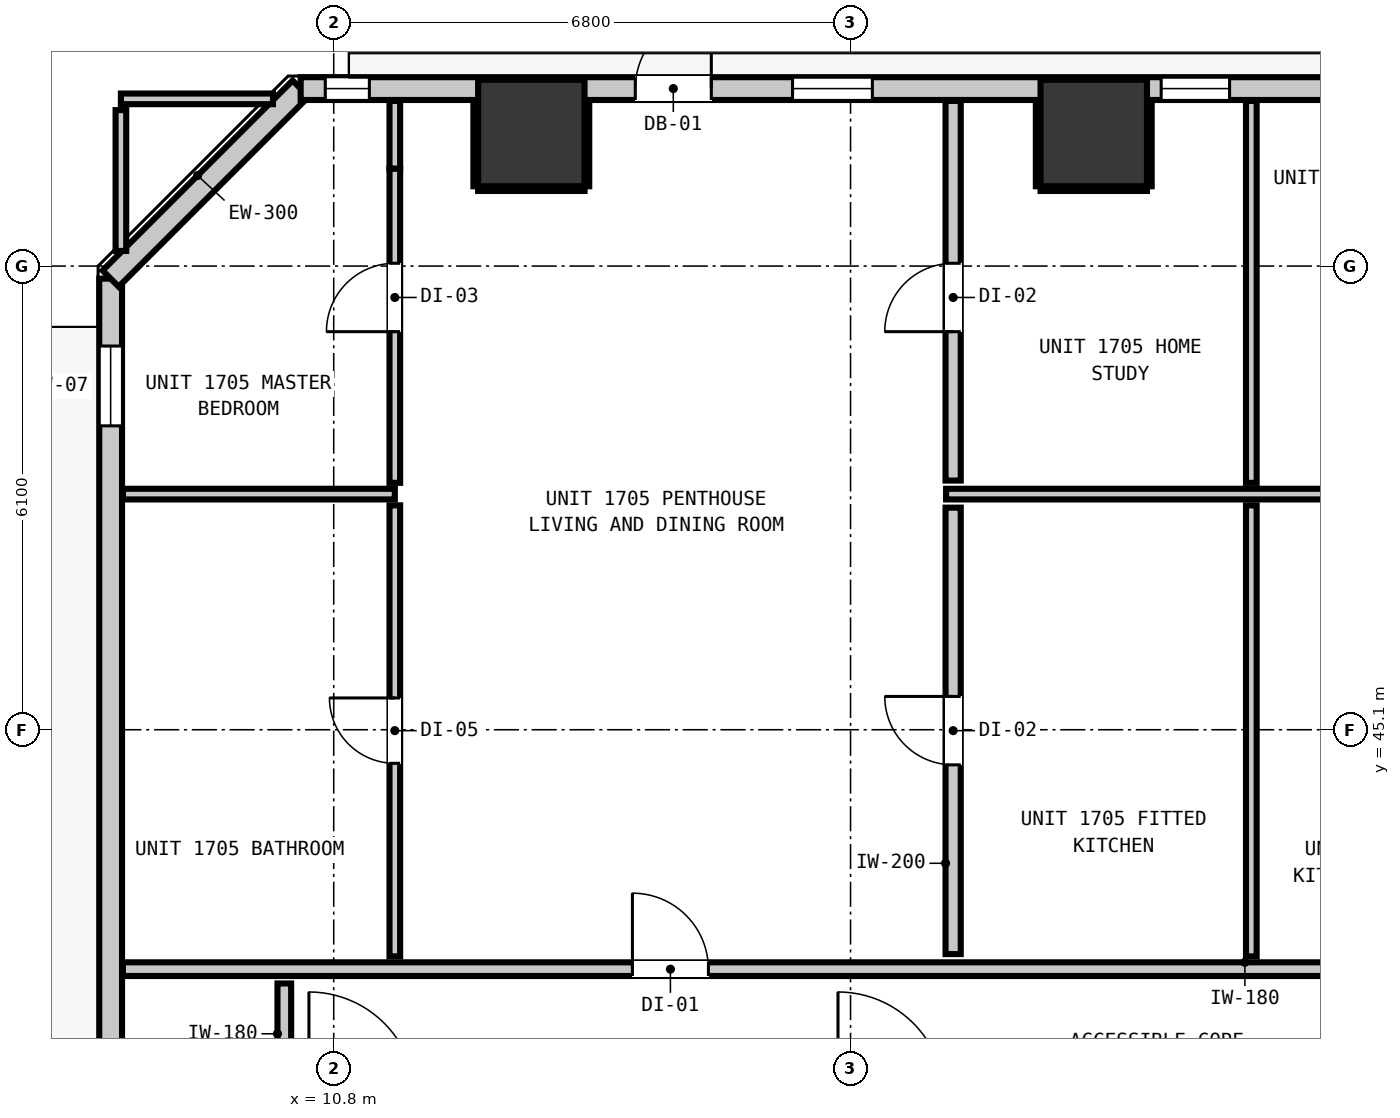
"""IFC4 building model, lengths in metres.
Left out: names, types, materials, properties, quantities, classifications, styles, units other than length and angle.
Written with IfcOpenShell. Run it as: python <this file> out.ifc"""

import sys

from ifc_helpers import new_model, si_unit, direction, frame, frame_2d, origin, origin_2d, place, context, subcontext, project, spatial, rectangle, extrude, element, fill, save


model = new_model("IFC4")
c1 = context("Model", 3, precision=1e-05, world=origin(), true_north=direction((0.0, 1.0)))
c2 = subcontext(c1, "Body", "Model", "MODEL_VIEW")
j1 = project(units=[si_unit("LENGTHUNIT", "METRE"), si_unit("PLANEANGLEUNIT", "RADIAN")], contexts=[c1])
p1 = place(None, origin())
s1 = spatial("IfcSite", under=j1, at=p1, CompositionType="ELEMENT")
p2 = place(p1, origin())
s2 = spatial("IfcBuilding", under=s1, at=p2, CompositionType="ELEMENT")
p3 = place(p2, frame((0.0, 0.0, 61.84)))
s3 = spatial("IfcBuildingStorey", under=s2, at=p3, CompositionType="ELEMENT", Elevation=61.84)
for number, where, z_axis, x_axis in (
    (1, (13.4, 52.95, -0.2), (0.0, 0.0, 1.0), (1.0, 0.0, 0.0)),
    (2, (20.8, 52.95, -0.2), (0.0, 0.0, 1.0), (1.0, 0.0, 0.0)),
):
    element("IfcColumn", number, at=place(p3, frame(where, z_axis=z_axis, x_axis=x_axis)), inside=s3, PredefinedType="COLUMN", context=c2, shape_type="SweptSolid", body=[
        extrude(rectangle(XDim=1.4, YDim=1.4, at=origin_2d()), origin(), (0.0, 0.0, 1.0), 3.52),
    ])
p4 = place(p3, frame((7.865, 16.365, 0.0), z_axis=(0.0, 0.0, 1.0), x_axis=(0.0, 1.0, 0.0)))
e3 = element("IfcWall", 3, at=p4, inside=s3, PredefinedType="STANDARD", context=c2, shape_type="SweptSolid", body=[
    extrude(rectangle(XDim=34.67, YDim=0.3, at=frame_2d((17.335, 0.0))), origin(), (0.0, 0.0, 1.0), 3.06),
])
p5 = place(p4, frame((1.251, 0.0, 0.0)))
e4 = element("IfcOpeningElement", 4, at=p5, cuts=e3, PredefinedType="OPENING", context=c2, shape_type="SweptSolid", body=[
    extrude(rectangle(XDim=1.0, YDim=2.15, at=frame_2d((0.5, 1.075))), frame((0.0, 0.16, 0.0), z_axis=(0.0, -1.0, 0.0), x_axis=(1.0, 0.0, 0.0)), (0.0, 0.0, 1.0), 0.32),
])
p6 = place(p4, frame((32.733, 0.0, 0.85)))
e5 = element("IfcOpeningElement", 5, at=p6, cuts=e3, PredefinedType="OPENING", context=c2, shape_type="SweptSolid", body=[
    extrude(rectangle(XDim=1.05, YDim=1.65, at=frame_2d((0.525, 0.825))), frame((0.0, 0.16, 0.0), z_axis=(0.0, -1.0, 0.0), x_axis=(1.0, 0.0, 0.0)), (0.0, 0.0, 1.0), 0.32),
])
p7 = place(p3, frame((7.865, 51.035, 0.0), z_axis=(0.0, 0.0, 1.0), x_axis=(0.707106781187, 0.707106781187, 0.0)))
e6 = element("IfcWall", 6, at=p7, inside=s3, PredefinedType="STANDARD", context=c2, shape_type="SweptSolid", body=[
    extrude(rectangle(XDim=3.536, YDim=0.3, at=frame_2d((1.768, 0.0))), origin(), (0.0, 0.0, 1.0), 3.06),
])
p8 = place(p3, frame((10.365, 53.535, 0.0), z_axis=(0.0, 0.0, 1.0), x_axis=(1.0, 0.0, 0.0)))
e7 = element("IfcWall", 7, at=p8, inside=s3, PredefinedType="STANDARD", context=c2, shape_type="SweptSolid", body=[
    extrude(rectangle(XDim=37.47, YDim=0.3, at=frame_2d((18.735, 0.0))), origin(), (0.0, 0.0, 1.0), 3.06),
])
p9 = place(p8, frame((4.403, 0.0, 0.0)))
e8 = element("IfcOpeningElement", 8, at=p9, cuts=e7, PredefinedType="OPENING", context=c2, shape_type="SweptSolid", body=[
    extrude(rectangle(XDim=1.0, YDim=2.15, at=frame_2d((0.5, 1.075))), frame((0.0, 0.16, 0.0), z_axis=(0.0, -1.0, 0.0), x_axis=(1.0, 0.0, 0.0)), (0.0, 0.0, 1.0), 0.32),
])
p10 = place(p8, frame((6.472, 0.0, 0.85)))
e9 = element("IfcOpeningElement", 9, at=p10, cuts=e7, PredefinedType="OPENING", context=c2, shape_type="SweptSolid", body=[
    extrude(rectangle(XDim=1.05, YDim=1.65, at=frame_2d((0.525, 0.825))), frame((0.0, 0.16, 0.0), z_axis=(0.0, -1.0, 0.0), x_axis=(1.0, 0.0, 0.0)), (0.0, 0.0, 1.0), 0.32),
])
p11 = place(p8, frame((0.324, 0.0, 0.85)))
e10 = element("IfcOpeningElement", 10, at=p11, cuts=e7, PredefinedType="OPENING", context=c2, shape_type="SweptSolid", body=[
    extrude(rectangle(XDim=0.58, YDim=1.5, at=frame_2d((0.29, 0.75))), frame((0.0, 0.16, 0.0), z_axis=(0.0, -1.0, 0.0), x_axis=(1.0, 0.0, 0.0)), (0.0, 0.0, 1.0), 0.32),
])
p12 = place(p8, frame((11.322, 0.0, 0.85)))
e11 = element("IfcOpeningElement", 11, at=p12, cuts=e7, PredefinedType="OPENING", context=c2, shape_type="SweptSolid", body=[
    extrude(rectangle(XDim=0.9, YDim=1.5, at=frame_2d((0.45, 0.75))), frame((0.0, 0.16, 0.0), z_axis=(0.0, -1.0, 0.0), x_axis=(1.0, 0.0, 0.0)), (0.0, 0.0, 1.0), 0.32),
])
p13 = place(p8, frame((21.42, 0.0, 0.85)))
e12 = element("IfcOpeningElement", 12, at=p13, cuts=e7, PredefinedType="OPENING", context=c2, shape_type="SweptSolid", body=[
    extrude(rectangle(XDim=1.05, YDim=1.65, at=frame_2d((0.525, 0.825))), frame((0.0, 0.16, 0.0), z_axis=(0.0, -1.0, 0.0), x_axis=(1.0, 0.0, 0.0)), (0.0, 0.0, 1.0), 0.32),
])
p14 = place(p8, frame((31.346, 0.0, 0.85)))
e13 = element("IfcOpeningElement", 13, at=p14, cuts=e7, PredefinedType="OPENING", context=c2, shape_type="SweptSolid", body=[
    extrude(rectangle(XDim=1.05, YDim=1.65, at=frame_2d((0.525, 0.825))), frame((0.0, 0.16, 0.0), z_axis=(0.0, -1.0, 0.0), x_axis=(1.0, 0.0, 0.0)), (0.0, 0.0, 1.0), 0.32),
])
p15 = place(p8, frame((27.107, 0.0, 0.85)))
e14 = element("IfcOpeningElement", 14, at=p15, cuts=e7, PredefinedType="OPENING", context=c2, shape_type="SweptSolid", body=[
    extrude(rectangle(XDim=0.58, YDim=1.5, at=frame_2d((0.29, 0.75))), frame((0.0, 0.16, 0.0), z_axis=(0.0, -1.0, 0.0), x_axis=(1.0, 0.0, 0.0)), (0.0, 0.0, 1.0), 0.32),
])
p16 = place(p8, frame((36.056, 0.0, 0.85)))
e15 = element("IfcOpeningElement", 15, at=p16, cuts=e7, PredefinedType="OPENING", context=c2, shape_type="SweptSolid", body=[
    extrude(rectangle(XDim=1.05, YDim=1.65, at=frame_2d((0.525, 0.825))), frame((0.0, 0.16, 0.0), z_axis=(0.0, -1.0, 0.0), x_axis=(1.0, 0.0, 0.0)), (0.0, 0.0, 1.0), 0.32),
])
p17 = place(p3, frame((8.027, 41.95, 0.0), z_axis=(0.0, 0.0, 1.0), x_axis=(1.0, 0.0, 0.0)))
e16 = element("IfcWall", 16, at=p17, inside=s3, PredefinedType="PARTITIONING", context=c2, shape_type="SweptSolid", body=[
    extrude(rectangle(XDim=42.146, YDim=0.18, at=frame_2d((21.073, 0.0))), origin(), (0.0, 0.0, 1.0), 3.06),
])
p18 = place(p17, frame((6.703, 0.0, 0.0)))
e17 = element("IfcOpeningElement", 17, at=p18, cuts=e16, PredefinedType="OPENING", context=c2, shape_type="SweptSolid", body=[
    extrude(rectangle(XDim=1.0, YDim=2.15, at=frame_2d((0.5, 1.075))), frame((0.0, 0.1, 0.0), z_axis=(0.0, -1.0, 0.0), x_axis=(1.0, 0.0, 0.0)), (0.0, 0.0, 1.0), 0.2),
])
p19 = place(p17, frame((21.82, 0.0, 0.0)))
e18 = element("IfcOpeningElement", 18, at=p19, cuts=e16, PredefinedType="OPENING", context=c2, shape_type="SweptSolid", body=[
    extrude(rectangle(XDim=1.0, YDim=2.15, at=frame_2d((0.5, 1.075))), frame((0.0, 0.1, 0.0), z_axis=(0.0, -1.0, 0.0), x_axis=(1.0, 0.0, 0.0)), (0.0, 0.0, 1.0), 0.2),
])
p20 = place(p17, frame((33.708, 0.0, 0.0)))
e19 = element("IfcOpeningElement", 19, at=p20, cuts=e16, PredefinedType="OPENING", context=c2, shape_type="SweptSolid", body=[
    extrude(rectangle(XDim=1.0, YDim=2.15, at=frame_2d((0.5, 1.075))), frame((0.0, 0.1, 0.0), z_axis=(0.0, -1.0, 0.0), x_axis=(1.0, 0.0, 0.0)), (0.0, 0.0, 1.0), 0.2),
])
p21 = place(p3, frame((8.027, 48.2, 0.0), z_axis=(0.0, 0.0, 1.0), x_axis=(1.0, 0.0, 0.0)))
e20 = element("IfcWall", 20, at=p21, inside=s3, PredefinedType="PARTITIONING", context=c2, shape_type="SweptSolid", body=[
    extrude(rectangle(XDim=3.577, YDim=0.14, at=frame_2d((1.789, 0.0))), origin(), (0.0, 0.0, 1.0), 3.06),
])
p22 = place(p3, frame((18.857, 48.2, 0.0), z_axis=(0.0, 0.0, 1.0), x_axis=(1.0, 0.0, 0.0)))
e21 = element("IfcWall", 21, at=p22, inside=s3, PredefinedType="PARTITIONING", context=c2, shape_type="SweptSolid", body=[
    extrude(rectangle(XDim=31.316, YDim=0.14, at=frame_2d((15.658, 0.0))), origin(), (0.0, 0.0, 1.0), 3.06),
])
p23 = place(p22, frame((11.04, 0.0, 0.0)))
e22 = element("IfcOpeningElement", 22, at=p23, cuts=e21, PredefinedType="OPENING", context=c2, shape_type="SweptSolid", body=[
    extrude(rectangle(XDim=0.9, YDim=2.1, at=frame_2d((0.45, 1.05))), frame((0.0, 0.08, 0.0), z_axis=(0.0, -1.0, 0.0), x_axis=(1.0, 0.0, 0.0)), (0.0, 0.0, 1.0), 0.16),
])
p24 = place(p22, frame((22.928, 0.0, 0.0)))
e23 = element("IfcOpeningElement", 23, at=p24, cuts=e21, PredefinedType="OPENING", context=c2, shape_type="SweptSolid", body=[
    extrude(rectangle(XDim=0.9, YDim=2.1, at=frame_2d((0.45, 1.05))), frame((0.0, 0.08, 0.0), z_axis=(0.0, -1.0, 0.0), x_axis=(1.0, 0.0, 0.0)), (0.0, 0.0, 1.0), 0.16),
])
p25 = place(p3, frame((8.0, 53.4, 0.0), z_axis=(0.0, 0.0, 1.0), x_axis=(1.0, 0.0, 0.0)))
e24 = element("IfcWall", 24, at=p25, inside=s3, PredefinedType="PARTITIONING", context=c2, shape_type="SweptSolid", body=[
    extrude(rectangle(XDim=2.001, YDim=0.14, at=frame_2d((1.0, 0.0))), origin(), (0.0, 0.0, 1.0), 3.06),
])
p26 = place(p3, frame((18.95, 42.148, 0.0), z_axis=(0.0, 0.0, 1.0), x_axis=(0.0, 1.0, 0.0)))
e25 = element("IfcWall", 25, at=p26, inside=s3, PredefinedType="PARTITIONING", context=c2, shape_type="SweptSolid", body=[
    extrude(rectangle(XDim=5.874, YDim=0.2, at=frame_2d((2.937, 0.0))), origin(), (0.0, 0.0, 1.0), 3.06),
])
p27 = place(p26, frame((2.49, 0.0, 0.0)))
e26 = element("IfcOpeningElement", 26, at=p27, cuts=e25, PredefinedType="OPENING", context=c2, shape_type="SweptSolid", body=[
    extrude(rectangle(XDim=0.9, YDim=2.1, at=frame_2d((0.45, 1.05))), frame((0.0, 0.11, 0.0), z_axis=(0.0, -1.0, 0.0), x_axis=(1.0, 0.0, 0.0)), (0.0, 0.0, 1.0), 0.22),
])
p28 = place(p3, frame((18.95, 48.378, 0.0), z_axis=(0.0, 0.0, 1.0), x_axis=(0.0, 1.0, 0.0)))
e27 = element("IfcWall", 27, at=p28, inside=s3, PredefinedType="PARTITIONING", context=c2, shape_type="SweptSolid", body=[
    extrude(rectangle(XDim=4.995, YDim=0.2, at=frame_2d((2.498, 0.0))), origin(), (0.0, 0.0, 1.0), 3.06),
])
p29 = place(p28, frame((1.959, 0.0, 0.0)))
e28 = element("IfcOpeningElement", 28, at=p29, cuts=e27, PredefinedType="OPENING", context=c2, shape_type="SweptSolid", body=[
    extrude(rectangle(XDim=0.9, YDim=2.1, at=frame_2d((0.45, 1.05))), frame((0.0, 0.11, 0.0), z_axis=(0.0, -1.0, 0.0), x_axis=(1.0, 0.0, 0.0)), (0.0, 0.0, 1.0), 0.22),
])
p30 = place(p3, frame((10.15, 40.438, 0.0), z_axis=(0.0, 0.0, 1.0), x_axis=(0.0, 1.0, 0.0)))
e29 = element("IfcWall", 29, at=p30, inside=s3, PredefinedType="PARTITIONING", context=c2, shape_type="SweptSolid", body=[
    extrude(rectangle(XDim=1.324, YDim=0.18, at=frame_2d((0.662, 0.0))), origin(), (0.0, 0.0, 1.0), 3.06),
])
p31 = place(p3, frame((8.0, 51.399, 0.0), z_axis=(0.0, 0.0, 1.0), x_axis=(0.0, 1.0, 0.0)))
e30 = element("IfcWall", 30, at=p31, inside=s3, PredefinedType="PARTITIONING", context=c2, shape_type="SweptSolid", body=[
    extrude(rectangle(XDim=1.853, YDim=0.14, at=frame_2d((0.927, 0.0))), origin(), (0.0, 0.0, 1.0), 3.06),
])
p32 = place(p3, frame((11.604, 42.118, 0.0), z_axis=(0.0, 0.0, 1.0), x_axis=(0.0, 1.0, 0.0)))
e31 = element("IfcWall", 31, at=p32, inside=s3, PredefinedType="PARTITIONING", context=c2, shape_type="SweptSolid", body=[
    extrude(rectangle(XDim=5.934, YDim=0.14, at=frame_2d((2.967, 0.0))), origin(), (0.0, 0.0, 1.0), 2.445),
])
p33 = place(p32, frame((2.54, 0.0, 0.0)))
e32 = element("IfcOpeningElement", 32, at=p33, cuts=e31, PredefinedType="OPENING", context=c2, shape_type="SweptSolid", body=[
    extrude(rectangle(XDim=0.86, YDim=2.02, at=frame_2d((0.43, 1.01))), frame((0.0, 0.08, 0.0), z_axis=(0.0, -1.0, 0.0), x_axis=(1.0, 0.0, 0.0)), (0.0, 0.0, 1.0), 0.16),
])
p34 = place(p3, frame((11.604, 48.348, 0.0), z_axis=(0.0, 0.0, 1.0), x_axis=(0.0, 1.0, 0.0)))
e33 = element("IfcWall", 33, at=p34, inside=s3, PredefinedType="PARTITIONING", context=c2, shape_type="SweptSolid", body=[
    extrude(rectangle(XDim=4.135, YDim=0.14, at=frame_2d((2.067, 0.0))), origin(), (0.0, 0.0, 1.0), 2.445),
])
p35 = place(p34, frame((1.989, 0.0, 0.0)))
e34 = element("IfcOpeningElement", 34, at=p35, cuts=e33, PredefinedType="OPENING", context=c2, shape_type="SweptSolid", body=[
    extrude(rectangle(XDim=0.9, YDim=2.1, at=frame_2d((0.45, 1.05))), frame((0.0, 0.08, 0.0), z_axis=(0.0, -1.0, 0.0), x_axis=(1.0, 0.0, 0.0)), (0.0, 0.0, 1.0), 0.16),
])
p36 = place(p3, frame((11.604, 52.483, 0.0), z_axis=(0.0, 0.0, 1.0), x_axis=(0.0, 1.0, 0.0)))
e35 = element("IfcWall", 35, at=p36, inside=s3, PredefinedType="PARTITIONING", context=c2, shape_type="SweptSolid", body=[
    extrude(rectangle(XDim=0.89, YDim=0.14, at=frame_2d((0.445, 0.0))), origin(), (0.0, 0.0, 1.0), 3.06),
])
p37 = place(p3, frame((22.873, 42.118, 0.0), z_axis=(0.0, 0.0, 1.0), x_axis=(0.0, 1.0, 0.0)))
e36 = element("IfcWall", 36, at=p37, inside=s3, PredefinedType="PARTITIONING", context=c2, shape_type="SweptSolid", body=[
    extrude(rectangle(XDim=5.934, YDim=0.14, at=frame_2d((2.967, 0.0))), origin(), (0.0, 0.0, 1.0), 3.06),
])
p38 = place(p3, frame((22.873, 48.348, 0.0), z_axis=(0.0, 0.0, 1.0), x_axis=(0.0, 1.0, 0.0)))
e37 = element("IfcWall", 37, at=p38, inside=s3, PredefinedType="PARTITIONING", context=c2, shape_type="SweptSolid", body=[
    extrude(rectangle(XDim=5.025, YDim=0.14, at=frame_2d((2.513, 0.0))), origin(), (0.0, 0.0, 1.0), 3.06),
])
p39 = place(p3, frame((12.7, 52.218, 0.0), z_axis=(0.0, 0.0, 1.0), x_axis=(1.0, 0.0, 0.0)))
e38 = element("IfcWall", 38, at=p39, inside=s3, PredefinedType="PARTITIONING", context=c2, shape_type="SweptSolid", body=[
    extrude(rectangle(XDim=1.4, YDim=0.06, at=frame_2d((0.7, 0.0))), origin(), (0.0, 0.0, 1.0), 1.45),
])
for number, where, z_axis, x_axis in (
    (39, (12.668, 52.25, 0.0), (0.0, 0.0, 1.0), (0.0, 1.0, 0.0)),
    (40, (14.132, 52.25, 0.0), (0.0, 0.0, 1.0), (0.0, 1.0, 0.0)),
):
    element("IfcWall", number, at=place(p3, frame(where, z_axis=z_axis, x_axis=x_axis)), inside=s3, PredefinedType="PARTITIONING", context=c2, shape_type="SweptSolid", body=[
        extrude(rectangle(XDim=1.12, YDim=0.06, at=frame_2d((0.56, 0.0))), origin(), (0.0, 0.0, 1.0), 1.45),
    ])
p40 = place(p3, frame((20.1, 52.218, 0.0), z_axis=(0.0, 0.0, 1.0), x_axis=(1.0, 0.0, 0.0)))
e41 = element("IfcWall", 41, at=p40, inside=s3, PredefinedType="PARTITIONING", context=c2, shape_type="SweptSolid", body=[
    extrude(rectangle(XDim=1.4, YDim=0.06, at=frame_2d((0.7, 0.0))), origin(), (0.0, 0.0, 1.0), 1.45),
])
for number, where, z_axis, x_axis in (
    (42, (20.068, 52.25, 0.0), (0.0, 0.0, 1.0), (0.0, 1.0, 0.0)),
    (43, (21.532, 52.25, 0.0), (0.0, 0.0, 1.0), (0.0, 1.0, 0.0)),
):
    element("IfcWall", number, at=place(p3, frame(where, z_axis=z_axis, x_axis=x_axis)), inside=s3, PredefinedType="PARTITIONING", context=c2, shape_type="SweptSolid", body=[
        extrude(rectangle(XDim=1.12, YDim=0.06, at=frame_2d((0.56, 0.0))), origin(), (0.0, 0.0, 1.0), 1.45),
    ])
p41 = place(p9, origin())
e44 = element("IfcDoor", 44, at=p41, inside=s3, OperationType="SINGLE_SWING_RIGHT", PredefinedType="DOOR", context=c2, shape_type="SweptSolid", body=[
    extrude(rectangle(XDim=1.0, YDim=2.15, at=frame_2d((0.5, 1.075))), frame((0.0, 0.025, 0.0), z_axis=(0.0, -1.0, 0.0), x_axis=(1.0, 0.0, 0.0)), (0.0, 0.0, 1.0), 0.05),
])
fill(e8, e44)
p42 = place(p6, origin())
e45 = element("IfcWindow", 45, at=p42, inside=s3, PartitioningType="SINGLE_PANEL", PredefinedType="WINDOW", context=c2, shape_type="SweptSolid", body=[
    extrude(rectangle(XDim=1.05, YDim=1.65, at=frame_2d((0.525, 0.825))), frame((0.0, 0.03, 0.0), z_axis=(0.0, -1.0, 0.0), x_axis=(1.0, 0.0, 0.0)), (0.0, 0.0, 1.0), 0.06),
])
fill(e5, e45)
p43 = place(p10, origin())
e46 = element("IfcWindow", 46, at=p43, inside=s3, PartitioningType="SINGLE_PANEL", PredefinedType="WINDOW", context=c2, shape_type="SweptSolid", body=[
    extrude(rectangle(XDim=1.05, YDim=1.65, at=frame_2d((0.525, 0.825))), frame((0.0, 0.03, 0.0), z_axis=(0.0, -1.0, 0.0), x_axis=(1.0, 0.0, 0.0)), (0.0, 0.0, 1.0), 0.06),
])
fill(e9, e46)
p44 = place(p11, origin())
e47 = element("IfcWindow", 47, at=p44, inside=s3, PartitioningType="SINGLE_PANEL", PredefinedType="WINDOW", context=c2, shape_type="SweptSolid", body=[
    extrude(rectangle(XDim=0.58, YDim=1.5, at=frame_2d((0.29, 0.75))), frame((0.0, 0.03, 0.0), z_axis=(0.0, -1.0, 0.0), x_axis=(1.0, 0.0, 0.0)), (0.0, 0.0, 1.0), 0.06),
])
fill(e10, e47)
p45 = place(p12, origin())
e48 = element("IfcWindow", 48, at=p45, inside=s3, PartitioningType="SINGLE_PANEL", PredefinedType="WINDOW", context=c2, shape_type="SweptSolid", body=[
    extrude(rectangle(XDim=0.9, YDim=1.5, at=frame_2d((0.45, 0.75))), frame((0.0, 0.03, 0.0), z_axis=(0.0, -1.0, 0.0), x_axis=(1.0, 0.0, 0.0)), (0.0, 0.0, 1.0), 0.06),
])
fill(e11, e48)
p46 = place(p18, origin())
e49 = element("IfcDoor", 49, at=p46, inside=s3, OperationType="SINGLE_SWING_LEFT", PredefinedType="DOOR", context=c2, shape_type="SweptSolid", body=[
    extrude(rectangle(XDim=1.0, YDim=2.15, at=frame_2d((0.5, 1.075))), frame((0.0, 0.025, 0.0), z_axis=(0.0, -1.0, 0.0), x_axis=(1.0, 0.0, 0.0)), (0.0, 0.0, 1.0), 0.05),
])
fill(e17, e49)
p47 = place(p33, origin())
e50 = element("IfcDoor", 50, at=p47, inside=s3, OperationType="SINGLE_SWING_RIGHT", PredefinedType="DOOR", context=c2, shape_type="SweptSolid", body=[
    extrude(rectangle(XDim=0.86, YDim=2.02, at=frame_2d((0.43, 1.01))), frame((0.0, 0.025, 0.0), z_axis=(0.0, -1.0, 0.0), x_axis=(1.0, 0.0, 0.0)), (0.0, 0.0, 1.0), 0.05),
])
fill(e32, e50)
p48 = place(p35, origin())
e51 = element("IfcDoor", 51, at=p48, inside=s3, OperationType="SINGLE_SWING_LEFT", PredefinedType="DOOR", context=c2, shape_type="SweptSolid", body=[
    extrude(rectangle(XDim=0.9, YDim=2.1, at=frame_2d((0.45, 1.05))), frame((0.0, 0.025, 0.0), z_axis=(0.0, -1.0, 0.0), x_axis=(1.0, 0.0, 0.0)), (0.0, 0.0, 1.0), 0.05),
])
fill(e34, e51)
p49 = place(p27, origin())
e52 = element("IfcDoor", 52, at=p49, inside=s3, OperationType="SINGLE_SWING_RIGHT", PredefinedType="DOOR", context=c2, shape_type="SweptSolid", body=[
    extrude(rectangle(XDim=0.9, YDim=2.1, at=frame_2d((0.45, 1.05))), frame((0.0, 0.025, 0.0), z_axis=(0.0, -1.0, 0.0), x_axis=(1.0, 0.0, 0.0)), (0.0, 0.0, 1.0), 0.05),
])
fill(e26, e52)
p50 = place(p29, origin())
e53 = element("IfcDoor", 53, at=p50, inside=s3, OperationType="SINGLE_SWING_LEFT", PredefinedType="DOOR", context=c2, shape_type="SweptSolid", body=[
    extrude(rectangle(XDim=0.9, YDim=2.1, at=frame_2d((0.45, 1.05))), frame((0.0, 0.025, 0.0), z_axis=(0.0, -1.0, 0.0), x_axis=(1.0, 0.0, 0.0)), (0.0, 0.0, 1.0), 0.05),
])
fill(e28, e53)
save(model, sys.argv[1])
